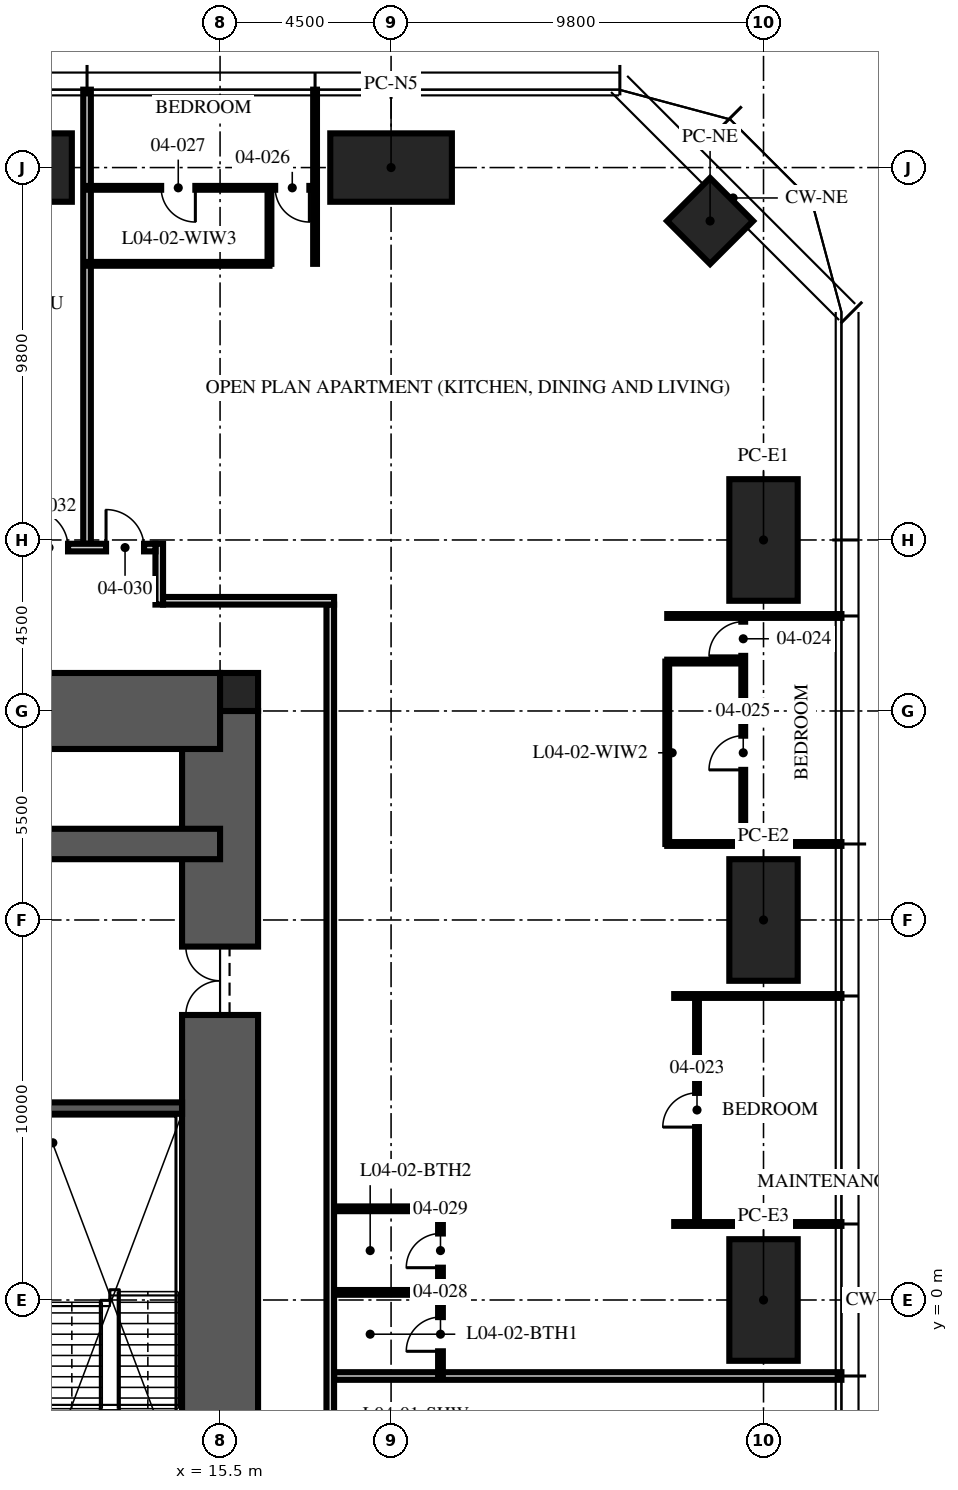
"""IFC4 building model, lengths in metres.
Left out: names, types, materials, properties, quantities, classifications, styles, units other than length and angle.
Written with IfcOpenShell. Run it as: python <this file> out.ifc"""

import sys

from ifc_helpers import new_model, si_unit, direction, frame, frame_2d, origin, origin_2d, place, context, subcontext, project, spatial, rectangle, hollow_rectangle, extrude, element, fill, save


model = new_model("IFC4")
c1 = context("Model", 3, precision=1e-05, world=origin(), true_north=direction((0.0, 1.0)))
c2 = subcontext(c1, "Body", "Model", "MODEL_VIEW")
j1 = project(units=[si_unit("LENGTHUNIT", "METRE"), si_unit("PLANEANGLEUNIT", "RADIAN")], contexts=[c1])
p1 = place(None, origin())
s1 = spatial("IfcSite", under=j1, at=p1, CompositionType="ELEMENT")
p2 = place(p1, origin())
s2 = spatial("IfcBuilding", under=s1, at=p2, CompositionType="ELEMENT")
p3 = place(p2, frame((0.0, 0.0, 21.0)))
s3 = spatial("IfcBuildingStorey", under=s2, at=p3, CompositionType="ELEMENT", Elevation=21.0)
p4 = place(p3, frame((15.5, -15.5, -0.25), z_axis=(0.0, 0.0, 1.0), x_axis=(0.0, 1.0, 0.0)))
e1 = element("IfcWall", 1, at=p4, inside=s3, PredefinedType="SHEAR", context=c2, shape_type="SweptSolid", body=[
    extrude(rectangle(XDim=31.0, YDim=2.0, at=frame_2d((15.5, 0.0))), origin(), (0.0, 0.0, 1.0), 3.75),
])
p5 = place(p4, frame((6.5, 0.0, 0.25)))
e2 = element("IfcOpeningElement", 2, at=p5, cuts=e1, PredefinedType="OPENING", context=c2, shape_type="SweptSolid", body=[
    extrude(rectangle(XDim=1.2, YDim=2.1, at=frame_2d((0.6, 1.05))), frame((0.0, 1.01, 0.0), z_axis=(0.0, -1.0, 0.0), x_axis=(1.0, 0.0, 0.0)), (0.0, 0.0, 1.0), 2.02),
])
p6 = place(p4, frame((23.0, 0.0, 0.25)))
e3 = element("IfcOpeningElement", 3, at=p6, cuts=e1, PredefinedType="OPENING", context=c2, shape_type="SweptSolid", body=[
    extrude(rectangle(XDim=1.8, YDim=2.1, at=frame_2d((0.9, 1.05))), frame((0.0, 1.01, 0.0), z_axis=(0.0, -1.0, 0.0), x_axis=(1.0, 0.0, 0.0)), (0.0, 0.0, 1.0), 2.02),
])
p7 = place(p3, frame((-15.5, 15.5, -0.25), z_axis=(0.0, 0.0, 1.0), x_axis=(1.0, 0.0, 0.0)))
e4 = element("IfcWall", 4, at=p7, inside=s3, PredefinedType="SHEAR", context=c2, shape_type="SweptSolid", body=[
    extrude(rectangle(XDim=31.0, YDim=2.0, at=frame_2d((15.5, 0.0))), origin(), (0.0, 0.0, 1.0), 3.75),
])
p8 = place(p7, frame((10.4, 0.0, 0.25)))
e5 = element("IfcOpeningElement", 5, at=p8, cuts=e4, PredefinedType="OPENING", context=c2, shape_type="SweptSolid", body=[
    extrude(rectangle(XDim=1.1, YDim=2.1, at=frame_2d((0.55, 1.05))), frame((0.0, 1.01, 0.0), z_axis=(0.0, -1.0, 0.0), x_axis=(1.0, 0.0, 0.0)), (0.0, 0.0, 1.0), 2.02),
])
p9 = place(p7, frame((13.5, 0.0, 0.25)))
e6 = element("IfcOpeningElement", 6, at=p9, cuts=e4, PredefinedType="OPENING", context=c2, shape_type="SweptSolid", body=[
    extrude(rectangle(XDim=1.1, YDim=2.1, at=frame_2d((0.55, 1.05))), frame((0.0, 1.01, 0.0), z_axis=(0.0, -1.0, 0.0), x_axis=(1.0, 0.0, 0.0)), (0.0, 0.0, 1.0), 2.02),
])
p10 = place(p7, frame((16.6, 0.0, 0.25)))
e7 = element("IfcOpeningElement", 7, at=p10, cuts=e4, PredefinedType="OPENING", context=c2, shape_type="SweptSolid", body=[
    extrude(rectangle(XDim=1.1, YDim=2.1, at=frame_2d((0.55, 1.05))), frame((0.0, 1.01, 0.0), z_axis=(0.0, -1.0, 0.0), x_axis=(1.0, 0.0, 0.0)), (0.0, 0.0, 1.0), 2.02),
])
p11 = place(p3, frame((-15.5, 12.0, -0.25), z_axis=(0.0, 0.0, 1.0), x_axis=(1.0, 0.0, 0.0)))
e8 = element("IfcWall", 8, at=p11, inside=s3, PredefinedType="SHEAR", context=c2, shape_type="SweptSolid", body=[
    extrude(rectangle(XDim=31.0, YDim=0.8, at=frame_2d((15.5, 0.0))), origin(), (0.0, 0.0, 1.0), 3.75),
])
p12 = place(p3, frame((16.0, 16.0, -0.25), z_axis=(0.0, 0.0, 1.0), x_axis=(1.0, 0.0, 0.0)))
e9 = element("IfcColumn", 9, at=p12, inside=s3, PredefinedType="COLUMN", context=c2, shape_type="SweptSolid", body=[
    extrude(rectangle(XDim=1.0, YDim=1.0, at=origin_2d()), origin(), (0.0, 0.0, 1.0), 3.75),
])
for number, where, z_axis, x_axis in (
    (10, (10.0, 29.8, 0.0), (0.0, 0.0, 1.0), (1.0, 0.0, 0.0)),
    (11, (20.0, 29.8, 0.0), (0.0, 0.0, 1.0), (1.0, 0.0, 0.0)),
    (12, (29.8, 20.0, 0.0), (0.0, 0.0, 1.0), (0.0, 1.0, 0.0)),
    (13, (29.8, 10.0, 0.0), (0.0, 0.0, 1.0), (0.0, 1.0, 0.0)),
    (14, (29.8, 0.0, 0.0), (0.0, 0.0, 1.0), (0.0, 1.0, 0.0)),
):
    element("IfcColumn", number, at=place(p3, frame(where, z_axis=z_axis, x_axis=x_axis)), inside=s3, PredefinedType="COLUMN", context=c2, shape_type="SweptSolid", body=[
        extrude(hollow_rectangle(XDim=3.2, YDim=1.8, WallThickness=0.2, at=origin_2d()), origin(), (0.0, 0.0, 1.0), 3.75),
    ])
p13 = place(p3, frame((28.394, 28.394, 0.0), z_axis=(0.0, 0.0, 1.0), x_axis=(0.707106781187, -0.707106781187, 0.0)))
e15 = element("IfcColumn", 15, at=p13, inside=s3, PredefinedType="COLUMN", context=c2, shape_type="SweptSolid", body=[
    extrude(hollow_rectangle(XDim=1.6, YDim=1.6, WallThickness=0.1, at=origin_2d()), origin(), (0.0, 0.0, 1.0), 3.75),
])
p14 = place(p3, frame((14.5, 5.05, 0.0), z_axis=(0.0, 0.0, 1.0), x_axis=(-1.0, 0.0, 0.0)))
e16 = element("IfcWall", 16, at=p14, inside=s3, PredefinedType="SOLIDWALL", context=c2, shape_type="SweptSolid", body=[
    extrude(rectangle(XDim=3.7, YDim=0.3, at=frame_2d((1.85, 0.0))), origin(), (0.0, 0.0, 1.0), 3.5),
])
p15 = place(p3, frame((18.5, -2.0, 0.0), z_axis=(0.0, 0.0, 1.0), x_axis=(1.0, 0.0, 0.0)))
e17 = element("IfcWall", 17, at=p15, inside=s3, PredefinedType="PARTITIONING", context=c2, shape_type="SweptSolid", body=[
    extrude(rectangle(XDim=13.35, YDim=0.2, at=frame_2d((6.675, 0.0))), origin(), (0.0, 0.0, 1.0), 2.71),
])
for number, where, z_axis, x_axis in (
    (18, (27.45, 2.0, 0.0), (0.0, 0.0, 1.0), (1.0, 0.0, 0.0)),
    (19, (27.45, 8.0, 0.0), (0.0, 0.0, 1.0), (1.0, 0.0, 0.0)),
):
    element("IfcWall", number, at=place(p3, frame(where, z_axis=z_axis, x_axis=x_axis)), inside=s3, PredefinedType="PARTITIONING", context=c2, shape_type="SweptSolid", body=[
        extrude(rectangle(XDim=4.4, YDim=0.1, at=frame_2d((2.2, 0.0))), origin(), (0.0, 0.0, 1.0), 2.71),
    ])
for number, where, z_axis, x_axis in (
    (20, (27.267, 12.0, 0.0), (0.0, 0.0, 1.0), (1.0, 0.0, 0.0)),
    (21, (27.267, 18.0, 0.0), (0.0, 0.0, 1.0), (1.0, 0.0, 0.0)),
    (22, (18.0, 27.267, 0.0), (0.0, 0.0, 1.0), (0.0, 1.0, 0.0)),
):
    element("IfcWall", number, at=place(p3, frame(where, z_axis=z_axis, x_axis=x_axis)), inside=s3, PredefinedType="PARTITIONING", context=c2, shape_type="SweptSolid", body=[
        extrude(rectangle(XDim=4.583, YDim=0.1, at=frame_2d((2.292, 0.0))), origin(), (0.0, 0.0, 1.0), 2.71),
    ])
p16 = place(p3, frame((12.0, 19.9, 0.0), z_axis=(0.0, 0.0, 1.0), x_axis=(0.0, 1.0, 0.0)))
e23 = element("IfcWall", 23, at=p16, inside=s3, PredefinedType="PARTITIONING", context=c2, shape_type="SweptSolid", body=[
    extrude(rectangle(XDim=11.95, YDim=0.2, at=frame_2d((5.975, 0.0))), origin(), (0.0, 0.0, 1.0), 2.71),
])
p17 = place(p3, frame((28.05, 2.0, 0.0), z_axis=(0.0, 0.0, 1.0), x_axis=(0.0, 1.0, 0.0)))
e24 = element("IfcWall", 24, at=p17, inside=s3, PredefinedType="PARTITIONING", context=c2, shape_type="SweptSolid", body=[
    extrude(rectangle(XDim=6.0, YDim=0.1, at=frame_2d((3.0, 0.0))), origin(), (0.0, 0.0, 1.0), 2.61),
])
p18 = place(p17, frame((2.55, 0.0, 0.0)))
e25 = element("IfcOpeningElement", 25, at=p18, cuts=e24, PredefinedType="OPENING", context=c2, shape_type="SweptSolid", body=[
    extrude(rectangle(XDim=0.9, YDim=2.1, at=frame_2d((0.45, 1.05))), frame((0.0, 0.06, 0.0), z_axis=(0.0, -1.0, 0.0), x_axis=(1.0, 0.0, 0.0)), (0.0, 0.0, 1.0), 0.12),
])
p19 = place(p3, frame((29.267, 12.0, 0.0), z_axis=(0.0, 0.0, 1.0), x_axis=(0.0, 1.0, 0.0)))
e26 = element("IfcWall", 26, at=p19, inside=s3, PredefinedType="PARTITIONING", context=c2, shape_type="SweptSolid", body=[
    extrude(rectangle(XDim=6.0, YDim=0.1, at=frame_2d((3.0, 0.0))), origin(), (0.0, 0.0, 1.0), 2.61),
])
p20 = place(p19, frame((4.95, 0.0, 0.0)))
e27 = element("IfcOpeningElement", 27, at=p20, cuts=e26, PredefinedType="OPENING", context=c2, shape_type="SweptSolid", body=[
    extrude(rectangle(XDim=0.9, YDim=2.1, at=frame_2d((0.45, 1.05))), frame((0.0, 0.06, 0.0), z_axis=(0.0, -1.0, 0.0), x_axis=(1.0, 0.0, 0.0)), (0.0, 0.0, 1.0), 0.12),
])
p21 = place(p19, frame((1.95, 0.0, 0.0)))
e28 = element("IfcOpeningElement", 28, at=p21, cuts=e26, PredefinedType="OPENING", context=c2, shape_type="SweptSolid", body=[
    extrude(rectangle(XDim=0.9, YDim=2.1, at=frame_2d((0.45, 1.05))), frame((0.0, 0.06, 0.0), z_axis=(0.0, -1.0, 0.0), x_axis=(1.0, 0.0, 0.0)), (0.0, 0.0, 1.0), 0.12),
])
p22 = place(p3, frame((27.267, 16.8, 0.0), z_axis=(0.0, 0.0, 1.0), x_axis=(1.0, 0.0, 0.0)))
e29 = element("IfcWall", 29, at=p22, inside=s3, PredefinedType="PARTITIONING", context=c2, shape_type="SweptSolid", body=[
    extrude(rectangle(XDim=2.0, YDim=0.1, at=frame_2d((1.0, 0.0))), origin(), (0.0, 0.0, 1.0), 3.5),
])
p23 = place(p3, frame((27.267, 12.0, 0.0), z_axis=(0.0, 0.0, 1.0), x_axis=(0.0, 1.0, 0.0)))
e30 = element("IfcWall", 30, at=p23, inside=s3, PredefinedType="PARTITIONING", context=c2, shape_type="SweptSolid", body=[
    extrude(rectangle(XDim=4.8, YDim=0.1, at=frame_2d((2.4, 0.0))), origin(), (0.0, 0.0, 1.0), 2.61),
])
p24 = place(p3, frame((18.0, 29.267, 0.0), z_axis=(0.0, 0.0, 1.0), x_axis=(-1.0, 0.0, 0.0)))
e31 = element("IfcWall", 31, at=p24, inside=s3, PredefinedType="PARTITIONING", context=c2, shape_type="SweptSolid", body=[
    extrude(rectangle(XDim=6.0, YDim=0.1, at=frame_2d((3.0, 0.0))), origin(), (0.0, 0.0, 1.0), 2.61),
])
p25 = place(p24, frame((0.15, 0.0, 0.0)))
e32 = element("IfcOpeningElement", 32, at=p25, cuts=e31, PredefinedType="OPENING", context=c2, shape_type="SweptSolid", body=[
    extrude(rectangle(XDim=0.9, YDim=2.1, at=frame_2d((0.45, 1.05))), frame((0.0, 0.06, 0.0), z_axis=(0.0, -1.0, 0.0), x_axis=(1.0, 0.0, 0.0)), (0.0, 0.0, 1.0), 0.12),
])
p26 = place(p24, frame((3.15, 0.0, 0.0)))
e33 = element("IfcOpeningElement", 33, at=p26, cuts=e31, PredefinedType="OPENING", context=c2, shape_type="SweptSolid", body=[
    extrude(rectangle(XDim=0.9, YDim=2.1, at=frame_2d((0.45, 1.05))), frame((0.0, 0.06, 0.0), z_axis=(0.0, -1.0, 0.0), x_axis=(1.0, 0.0, 0.0)), (0.0, 0.0, 1.0), 0.12),
])
p27 = place(p3, frame((16.8, 27.267, 0.0), z_axis=(0.0, 0.0, 1.0), x_axis=(0.0, 1.0, 0.0)))
e34 = element("IfcWall", 34, at=p27, inside=s3, PredefinedType="PARTITIONING", context=c2, shape_type="SweptSolid", body=[
    extrude(rectangle(XDim=2.0, YDim=0.1, at=frame_2d((1.0, 0.0))), origin(), (0.0, 0.0, 1.0), 3.5),
])
p28 = place(p3, frame((16.8, 27.267, 0.0), z_axis=(0.0, 0.0, 1.0), x_axis=(-1.0, 0.0, 0.0)))
e35 = element("IfcWall", 35, at=p28, inside=s3, PredefinedType="PARTITIONING", context=c2, shape_type="SweptSolid", body=[
    extrude(rectangle(XDim=4.8, YDim=0.1, at=frame_2d((2.4, 0.0))), origin(), (0.0, 0.0, 1.0), 2.61),
])
p29 = place(p3, frame((21.3, -2.0, 0.0), z_axis=(0.0, 0.0, 1.0), x_axis=(0.0, 1.0, 0.0)))
e36 = element("IfcWall", 36, at=p29, inside=s3, PredefinedType="PARTITIONING", context=c2, shape_type="SweptSolid", body=[
    extrude(rectangle(XDim=4.4, YDim=0.125, at=frame_2d((2.2, 0.0))), origin(), (0.0, 0.0, 1.0), 2.492),
])
p30 = place(p29, frame((0.65, 0.0, 0.0)))
e37 = element("IfcOpeningElement", 37, at=p30, cuts=e36, PredefinedType="OPENING", context=c2, shape_type="SweptSolid", body=[
    extrude(rectangle(XDim=0.9, YDim=2.1, at=frame_2d((0.45, 1.05))), frame((0.0, 0.073, 0.0), z_axis=(0.0, -1.0, 0.0), x_axis=(1.0, 0.0, 0.0)), (0.0, 0.0, 1.0), 0.145),
])
p31 = place(p29, frame((2.85, 0.0, 0.0)))
e38 = element("IfcOpeningElement", 38, at=p31, cuts=e36, PredefinedType="OPENING", context=c2, shape_type="SweptSolid", body=[
    extrude(rectangle(XDim=0.9, YDim=2.1, at=frame_2d((0.45, 1.05))), frame((0.0, 0.073, 0.0), z_axis=(0.0, -1.0, 0.0), x_axis=(1.0, 0.0, 0.0)), (0.0, 0.0, 1.0), 0.145),
])
p32 = place(p3, frame((18.5, 0.2, 0.0), z_axis=(0.0, 0.0, 1.0), x_axis=(1.0, 0.0, 0.0)))
e39 = element("IfcWall", 39, at=p32, inside=s3, PredefinedType="PARTITIONING", context=c2, shape_type="SweptSolid", body=[
    extrude(rectangle(XDim=2.8, YDim=0.125, at=frame_2d((1.4, 0.0))), origin(), (0.0, 0.0, 1.0), 2.492),
])
p33 = place(p3, frame((18.5, 2.4, 0.0), z_axis=(0.0, 0.0, 1.0), x_axis=(1.0, 0.0, 0.0)))
e40 = element("IfcWall", 40, at=p33, inside=s3, PredefinedType="PARTITIONING", context=c2, shape_type="SweptSolid", body=[
    extrude(rectangle(XDim=2.8, YDim=0.125, at=frame_2d((1.4, 0.0))), origin(), (0.0, 0.0, 1.0), 3.5),
])
p34 = place(p3, frame((18.4, -6.0, 0.0), z_axis=(0.0, 0.0, 1.0), x_axis=(0.0, 1.0, 0.0)))
e41 = element("IfcWall", 41, at=p34, inside=s3, PredefinedType="PARTITIONING", context=c2, shape_type="SweptSolid", body=[
    extrude(rectangle(XDim=24.3, YDim=0.2, at=frame_2d((12.15, 0.0))), origin(), (0.0, 0.0, 1.0), 2.3),
])
p35 = place(p3, frame((13.9, 18.3, 0.0), z_axis=(0.0, 0.0, 1.0), x_axis=(0.0, 1.0, 0.0)))
e42 = element("IfcWall", 42, at=p35, inside=s3, PredefinedType="PARTITIONING", context=c2, shape_type="SweptSolid", body=[
    extrude(rectangle(XDim=1.6, YDim=0.2, at=frame_2d((0.8, 0.0))), origin(), (0.0, 0.0, 1.0), 3.5),
])
p36 = place(p3, frame((10.2, 19.8, 0.0), z_axis=(0.0, 0.0, 1.0), x_axis=(1.0, 0.0, 0.0)))
e43 = element("IfcWall", 43, at=p36, inside=s3, PredefinedType="PARTITIONING", context=c2, shape_type="SweptSolid", body=[
    extrude(rectangle(XDim=3.6, YDim=0.2, at=frame_2d((1.8, 0.0))), origin(), (0.0, 0.0, 1.0), 3.5),
])
p37 = place(p36, frame((2.3, 0.0, 0.0)))
e44 = element("IfcOpeningElement", 44, at=p37, cuts=e43, PredefinedType="OPENING", context=c2, shape_type="SweptSolid", body=[
    extrude(rectangle(XDim=1.0, YDim=2.2, at=frame_2d((0.5, 1.1))), frame((0.0, 0.11, 0.0), z_axis=(0.0, -1.0, 0.0), x_axis=(1.0, 0.0, 0.0)), (0.0, 0.0, 1.0), 0.22),
])
p38 = place(p36, frame((0.3, 0.0, 0.0)))
e45 = element("IfcOpeningElement", 45, at=p38, cuts=e43, PredefinedType="OPENING", context=c2, shape_type="SweptSolid", body=[
    extrude(rectangle(XDim=1.0, YDim=2.2, at=frame_2d((0.5, 1.1))), frame((0.0, 0.11, 0.0), z_axis=(0.0, -1.0, 0.0), x_axis=(1.0, 0.0, 0.0)), (0.0, 0.0, 1.0), 0.22),
])
p39 = place(p3, frame((14.0, 18.4, 0.0), z_axis=(0.0, 0.0, 1.0), x_axis=(1.0, 0.0, 0.0)))
e46 = element("IfcWall", 46, at=p39, inside=s3, PredefinedType="PARTITIONING", context=c2, shape_type="SweptSolid", body=[
    extrude(rectangle(XDim=4.5, YDim=0.2, at=frame_2d((2.25, 0.0))), origin(), (0.0, 0.0, 1.0), 2.3),
])
p40 = place(p6, origin())
e47 = element("IfcDoor", 47, at=p40, inside=s3, OperationType="DOUBLE_DOOR_SINGLE_SWING", PredefinedType="DOOR", context=c2, shape_type="SweptSolid", body=[
    extrude(rectangle(XDim=1.8, YDim=2.1, at=frame_2d((0.9, 1.05))), frame((0.0, 0.025, 0.0), z_axis=(0.0, -1.0, 0.0), x_axis=(1.0, 0.0, 0.0)), (0.0, 0.0, 1.0), 0.05),
])
fill(e3, e47)
p41 = place(p18, origin())
e48 = element("IfcDoor", 48, at=p41, inside=s3, OperationType="SINGLE_SWING_LEFT", PredefinedType="DOOR", context=c2, shape_type="SweptSolid", body=[
    extrude(rectangle(XDim=0.9, YDim=2.1, at=frame_2d((0.45, 1.05))), frame((0.0, 0.025, 0.0), z_axis=(0.0, -1.0, 0.0), x_axis=(1.0, 0.0, 0.0)), (0.0, 0.0, 1.0), 0.05),
])
fill(e25, e48)
p42 = place(p20, origin())
e49 = element("IfcDoor", 49, at=p42, inside=s3, OperationType="SINGLE_SWING_LEFT", PredefinedType="DOOR", context=c2, shape_type="SweptSolid", body=[
    extrude(rectangle(XDim=0.9, YDim=2.1, at=frame_2d((0.45, 1.05))), frame((0.0, 0.025, 0.0), z_axis=(0.0, -1.0, 0.0), x_axis=(1.0, 0.0, 0.0)), (0.0, 0.0, 1.0), 0.05),
])
fill(e27, e49)
p43 = place(p21, origin())
e50 = element("IfcDoor", 50, at=p43, inside=s3, OperationType="SINGLE_SWING_LEFT", PredefinedType="DOOR", context=c2, shape_type="SweptSolid", body=[
    extrude(rectangle(XDim=0.9, YDim=2.1, at=frame_2d((0.45, 1.05))), frame((0.0, 0.025, 0.0), z_axis=(0.0, -1.0, 0.0), x_axis=(1.0, 0.0, 0.0)), (0.0, 0.0, 1.0), 0.05),
])
fill(e28, e50)
p44 = place(p25, origin())
e51 = element("IfcDoor", 51, at=p44, inside=s3, OperationType="SINGLE_SWING_LEFT", PredefinedType="DOOR", context=c2, shape_type="SweptSolid", body=[
    extrude(rectangle(XDim=0.9, YDim=2.1, at=frame_2d((0.45, 1.05))), frame((0.0, 0.025, 0.0), z_axis=(0.0, -1.0, 0.0), x_axis=(1.0, 0.0, 0.0)), (0.0, 0.0, 1.0), 0.05),
])
fill(e32, e51)
p45 = place(p26, origin())
e52 = element("IfcDoor", 52, at=p45, inside=s3, OperationType="SINGLE_SWING_LEFT", PredefinedType="DOOR", context=c2, shape_type="SweptSolid", body=[
    extrude(rectangle(XDim=0.9, YDim=2.1, at=frame_2d((0.45, 1.05))), frame((0.0, 0.025, 0.0), z_axis=(0.0, -1.0, 0.0), x_axis=(1.0, 0.0, 0.0)), (0.0, 0.0, 1.0), 0.05),
])
fill(e33, e52)
p46 = place(p30, origin())
e53 = element("IfcDoor", 53, at=p46, inside=s3, OperationType="SINGLE_SWING_LEFT", PredefinedType="DOOR", context=c2, shape_type="SweptSolid", body=[
    extrude(rectangle(XDim=0.9, YDim=2.1, at=frame_2d((0.45, 1.05))), frame((0.0, 0.025, 0.0), z_axis=(0.0, -1.0, 0.0), x_axis=(1.0, 0.0, 0.0)), (0.0, 0.0, 1.0), 0.05),
])
fill(e37, e53)
p47 = place(p31, origin())
e54 = element("IfcDoor", 54, at=p47, inside=s3, OperationType="SINGLE_SWING_LEFT", PredefinedType="DOOR", context=c2, shape_type="SweptSolid", body=[
    extrude(rectangle(XDim=0.9, YDim=2.1, at=frame_2d((0.45, 1.05))), frame((0.0, 0.025, 0.0), z_axis=(0.0, -1.0, 0.0), x_axis=(1.0, 0.0, 0.0)), (0.0, 0.0, 1.0), 0.05),
])
fill(e38, e54)
p48 = place(p37, origin())
e55 = element("IfcDoor", 55, at=p48, inside=s3, OperationType="SINGLE_SWING_LEFT", PredefinedType="DOOR", context=c2, shape_type="SweptSolid", body=[
    extrude(rectangle(XDim=1.0, YDim=2.2, at=frame_2d((0.5, 1.1))), frame((0.0, 0.025, 0.0), z_axis=(0.0, -1.0, 0.0), x_axis=(1.0, 0.0, 0.0)), (0.0, 0.0, 1.0), 0.05),
])
fill(e44, e55)
p49 = place(p38, origin())
e56 = element("IfcDoor", 56, at=p49, inside=s3, OperationType="SINGLE_SWING_LEFT", PredefinedType="DOOR", context=c2, shape_type="SweptSolid", body=[
    extrude(rectangle(XDim=1.0, YDim=2.2, at=frame_2d((0.5, 1.1))), frame((0.0, 0.025, 0.0), z_axis=(0.0, -1.0, 0.0), x_axis=(1.0, 0.0, 0.0)), (0.0, 0.0, 1.0), 0.05),
])
fill(e45, e56)
save(model, sys.argv[1])
